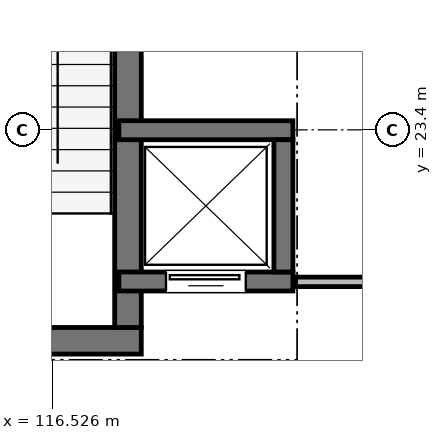
"""IFC4 building model, lengths in metres.
Left out: names, types, materials, properties, quantities, classifications, styles, units other than length and angle.
Written with IfcOpenShell. Run it as: python <this file> out.ifc"""

import sys

from ifc_helpers import new_model, si_unit, direction, frame, frame_2d, origin, place, context, subcontext, project, spatial, rectangle, extrude, element, fill, save


model = new_model("IFC4")
c1 = context("Model", 3, precision=1e-05, world=origin(), true_north=direction((0.0, 1.0)))
c2 = subcontext(c1, "Body", "Model", "MODEL_VIEW")
j1 = project(units=[si_unit("LENGTHUNIT", "METRE"), si_unit("PLANEANGLEUNIT", "RADIAN")], contexts=[c1])
p1 = place(None, origin())
s1 = spatial("IfcSite", under=j1, at=p1, CompositionType="ELEMENT")
p2 = place(p1, origin())
s2 = spatial("IfcBuilding", under=s1, at=p2, CompositionType="ELEMENT")
p3 = place(p2, frame((0.0, 0.0, 5.4)))
s3 = spatial("IfcBuildingStorey", under=s2, at=p3, CompositionType="ELEMENT", Elevation=5.4)
p4 = place(p3, frame((113.85, 20.625, 0.0), z_axis=(0.0, 0.0, 1.0), x_axis=(1.0, 0.0, 0.0)))
e1 = element("IfcWall", 1, at=p4, inside=s3, PredefinedType="SHEAR", context=c2, shape_type="SweptSolid", body=[
    extrude(rectangle(XDim=3.85, YDim=0.35, at=frame_2d((1.925, 0.0))), origin(), (0.0, 0.0, 1.0), 4.58),
])
p5 = place(p4, frame((0.45, 0.0, 0.0)))
e2 = element("IfcOpeningElement", 2, at=p5, cuts=e1, PredefinedType="OPENING", context=c2, shape_type="SweptSolid", body=[
    extrude(rectangle(XDim=1.5, YDim=2.2, at=frame_2d((0.75, 1.1))), frame((0.0, 0.185, 0.0), z_axis=(0.0, -1.0, 0.0), x_axis=(1.0, 0.0, 0.0)), (0.0, 0.0, 1.0), 0.37),
])
p6 = place(p3, frame((117.525, 20.8, 0.0), z_axis=(0.0, 0.0, 1.0), x_axis=(0.0, 1.0, 0.0)))
e3 = element("IfcWall", 3, at=p6, inside=s3, PredefinedType="SHEAR", context=c2, shape_type="SweptSolid", body=[
    extrude(rectangle(XDim=7.05, YDim=0.35, at=frame_2d((3.525, 0.0))), origin(), (0.0, 0.0, 1.0), 4.58),
])
p7 = place(p3, frame((117.405, 21.405, 0.0), z_axis=(0.0, 0.0, 1.0), x_axis=(1.0, 0.0, 0.0)))
e4 = element("IfcWall", 4, at=p7, inside=s3, PredefinedType="SHEAR", context=c2, shape_type="SweptSolid", body=[
    extrude(rectangle(XDim=2.29, YDim=0.25, at=frame_2d((1.145, 0.0))), origin(), (0.0, 0.0, 1.0), 4.56),
])
p8 = place(p7, frame((0.62, 0.0, 0.0)))
e5 = element("IfcOpeningElement", 5, at=p8, cuts=e4, PredefinedType="OPENING", context=c2, shape_type="SweptSolid", body=[
    extrude(rectangle(XDim=1.05, YDim=2.15, at=frame_2d((0.525, 1.075))), frame((0.0, 0.135, 0.0), z_axis=(0.0, -1.0, 0.0), x_axis=(1.0, 0.0, 0.0)), (0.0, 0.0, 1.0), 0.27),
])
p9 = place(p3, frame((117.405, 23.395, 0.0), z_axis=(0.0, 0.0, 1.0), x_axis=(1.0, 0.0, 0.0)))
e6 = element("IfcWall", 6, at=p9, inside=s3, PredefinedType="SHEAR", context=c2, shape_type="SweptSolid", body=[
    extrude(rectangle(XDim=2.29, YDim=0.25, at=frame_2d((1.145, 0.0))), origin(), (0.0, 0.0, 1.0), 4.56),
])
p10 = place(p3, frame((119.57, 21.53, 0.0), z_axis=(0.0, 0.0, 1.0), x_axis=(0.0, 1.0, 0.0)))
e7 = element("IfcWall", 7, at=p10, inside=s3, PredefinedType="SHEAR", context=c2, shape_type="SweptSolid", body=[
    extrude(rectangle(XDim=1.74, YDim=0.25, at=frame_2d((0.87, 0.0))), origin(), (0.0, 0.0, 1.0), 4.56),
])
p11 = place(p3, frame((119.73, 21.4, 0.0), z_axis=(0.0, 0.0, 1.0), x_axis=(1.0, 0.0, 0.0)))
e8 = element("IfcWall", 8, at=p11, inside=s3, PredefinedType="PARTITIONING", context=c2, shape_type="SweptSolid", body=[
    extrude(rectangle(XDim=14.24, YDim=0.125, at=frame_2d((7.12, 0.0))), origin(), (0.0, 0.0, 1.0), 3.825),
])
p12 = place(p11, frame((6.62, 0.0, 0.0)))
e9 = element("IfcOpeningElement", 9, at=p12, cuts=e8, PredefinedType="OPENING", context=c2, shape_type="SweptSolid", body=[
    extrude(rectangle(XDim=1.0, YDim=2.15, at=frame_2d((0.5, 1.075))), frame((0.0, 0.073, 0.0), z_axis=(0.0, -1.0, 0.0), x_axis=(1.0, 0.0, 0.0)), (0.0, 0.0, 1.0), 0.145),
])
p13 = place(p8, frame((1.05, 0.0, 0.0), z_axis=(0.0, 0.0, 1.0), x_axis=(-1.0, 0.0, 0.0)))
e10 = element("IfcDoor", 10, at=p13, inside=s3, OperationType="SLIDING_TO_RIGHT", PredefinedType="DOOR", context=c2, shape_type="SweptSolid", body=[
    extrude(rectangle(XDim=1.05, YDim=2.15, at=frame_2d((0.525, 1.075))), frame((0.0, 0.025, 0.0), z_axis=(0.0, -1.0, 0.0), x_axis=(1.0, 0.0, 0.0)), (0.0, 0.0, 1.0), 0.05),
])
fill(e5, e10)
save(model, sys.argv[1])
